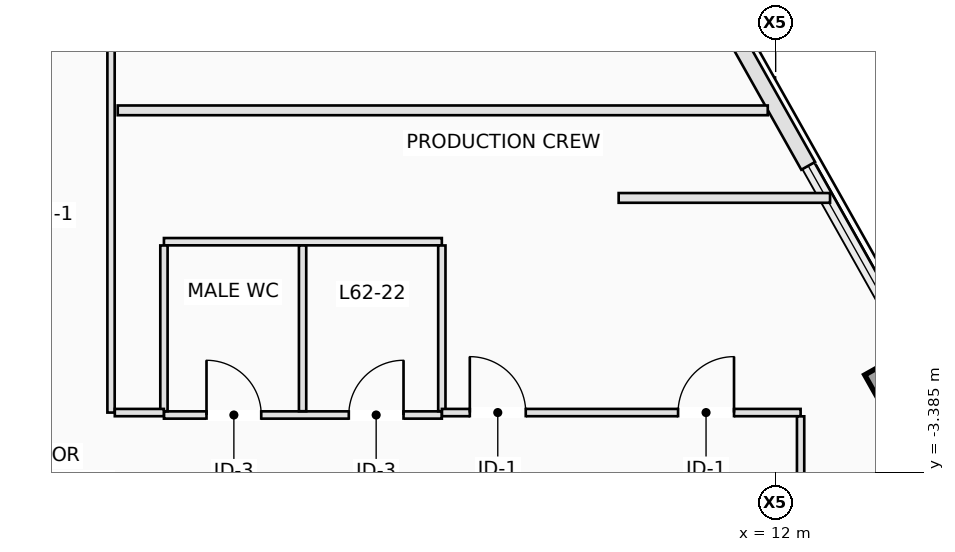
"""IFC4 building model, lengths in metres.
Left out: names, types, materials, properties, quantities, classifications, styles, units other than length and angle.
Written with IfcOpenShell. Run it as: python <this file> out.ifc"""

import sys

from ifc_helpers import new_model, si_unit, direction, frame, frame_2d, origin, origin_2d, place, context, subcontext, project, spatial, rectangle, extrude, element, fill, save


model = new_model("IFC4")
c1 = context("Model", 3, precision=1e-05, world=origin(), true_north=direction((0.0, 1.0)))
c2 = subcontext(c1, "Body", "Model", "MODEL_VIEW")
j1 = project(units=[si_unit("LENGTHUNIT", "METRE"), si_unit("PLANEANGLEUNIT", "RADIAN")], contexts=[c1])
p1 = place(None, origin())
s1 = spatial("IfcSite", under=j1, at=p1, CompositionType="ELEMENT")
p2 = place(p1, origin())
s2 = spatial("IfcBuilding", under=s1, at=p2, CompositionType="ELEMENT")
p3 = place(p2, frame((0.0, 0.0, 225.4)))
s3 = spatial("IfcBuildingStorey", under=s2, at=p3, CompositionType="ELEMENT", Elevation=225.4)
p4 = place(p3, frame((14.077, -1.952, 0.0), z_axis=(0.0, 0.0, 1.0), x_axis=(0.871575139605, 0.490261946333, 0.0)))
e1 = element("IfcColumn", 1, at=p4, inside=s3, PredefinedType="COLUMN", context=c2, shape_type="SweptSolid", body=[
    extrude(rectangle(XDim=0.9, YDim=0.9, at=origin_2d()), origin(), (0.0, 0.0, 1.0), 3.5),
])
p5 = place(p3, frame((10.923, 4.522, 0.0), z_axis=(0.0, 0.0, 1.0), x_axis=(0.490264765862, -0.871573553611, 0.0)))
e2 = element("IfcWall", 2, at=p5, inside=s3, PredefinedType="STANDARD", context=c2, shape_type="SweptSolid", body=[
    extrude(rectangle(XDim=3.287, YDim=0.26, at=frame_2d((1.644, 0.0))), origin(), (0.0, 0.0, 1.0), 1.75),
])
p6 = place(p3, frame((1.94, -2.44, 0.0), z_axis=(0.0, 0.0, 1.0), x_axis=(1.0, 0.0, 0.0)))
e3 = element("IfcWall", 3, at=p6, inside=s3, PredefinedType="PARTITIONING", context=c2, shape_type="SweptSolid", body=[
    extrude(rectangle(XDim=4.57, YDim=0.12, at=frame_2d((2.285, 0.0))), origin(), (0.0, 0.0, 1.0), 2.943),
])
p7 = place(p6, frame((0.7, 0.0, 0.0)))
e4 = element("IfcOpeningElement", 4, at=p7, cuts=e3, PredefinedType="OPENING", context=c2, shape_type="SweptSolid", body=[
    extrude(rectangle(XDim=0.9, YDim=2.12, at=frame_2d((0.45, 1.06))), frame((0.0, 0.07, 0.0), z_axis=(0.0, -1.0, 0.0), x_axis=(1.0, 0.0, 0.0)), (0.0, 0.0, 1.0), 0.14),
])
p8 = place(p6, frame((3.04, 0.0, 0.0)))
e5 = element("IfcOpeningElement", 5, at=p8, cuts=e3, PredefinedType="OPENING", context=c2, shape_type="SweptSolid", body=[
    extrude(rectangle(XDim=0.9, YDim=2.12, at=frame_2d((0.45, 1.06))), frame((0.0, 0.07, 0.0), z_axis=(0.0, -1.0, 0.0), x_axis=(1.0, 0.0, 0.0)), (0.0, 0.0, 1.0), 0.14),
])
p9 = place(p3, frame((1.94, 0.41, 0.0), z_axis=(0.0, 0.0, 1.0), x_axis=(1.0, 0.0, 0.0)))
e6 = element("IfcWall", 6, at=p9, inside=s3, PredefinedType="PARTITIONING", context=c2, shape_type="SweptSolid", body=[
    extrude(rectangle(XDim=4.57, YDim=0.12, at=frame_2d((2.285, 0.0))), origin(), (0.0, 0.0, 1.0), 3.25),
])
for number, where, z_axis, x_axis in (
    (7, (1.94, -2.378, 0.0), (0.0, 0.0, 1.0), (0.0, 1.0, 0.0)),
    (8, (4.22, -2.378, 0.0), (0.0, 0.0, 1.0), (0.0, 1.0, 0.0)),
    (9, (6.51, -2.378, 0.0), (0.0, 0.0, 1.0), (0.0, 1.0, 0.0)),
):
    element("IfcWall", number, at=place(p3, frame(where, z_axis=z_axis, x_axis=x_axis)), inside=s3, PredefinedType="PARTITIONING", context=c2, shape_type="SweptSolid", body=[
        extrude(rectangle(XDim=2.726, YDim=0.12, at=frame_2d((1.363, 0.0))), origin(), (0.0, 0.0, 1.0), 3.25),
    ])
p10 = place(p3, frame((1.07, 9.738, 0.0), z_axis=(0.0, 0.0, 1.0), x_axis=(0.0, -1.0, 0.0)))
e10 = element("IfcWall", 10, at=p10, inside=s3, PredefinedType="PARTITIONING", context=c2, shape_type="SweptSolid", body=[
    extrude(rectangle(XDim=12.138, YDim=0.12, at=frame_2d((6.069, 0.0))), origin(), (0.0, 0.0, 1.0), 3.25),
])
p11 = place(p10, frame((2.998, 0.0, 0.0)))
e11 = element("IfcOpeningElement", 11, at=p11, cuts=e10, PredefinedType="OPENING", context=c2, shape_type="SweptSolid", body=[
    extrude(rectangle(XDim=0.92, YDim=2.12, at=frame_2d((0.46, 1.06))), frame((0.0, 0.07, 0.0), z_axis=(0.0, -1.0, 0.0), x_axis=(1.0, 0.0, 0.0)), (0.0, 0.0, 1.0), 0.14),
])
p12 = place(p3, frame((1.132, -2.4, 0.0), z_axis=(0.0, 0.0, 1.0), x_axis=(1.0, 0.0, 0.0)))
e12 = element("IfcWall", 12, at=p12, inside=s3, PredefinedType="PARTITIONING", context=c2, shape_type="SweptSolid", body=[
    extrude(rectangle(XDim=0.806, YDim=0.12, at=frame_2d((0.403, 0.0))), origin(), (0.0, 0.0, 1.0), 2.943),
])
p13 = place(p3, frame((6.512, -2.4, 0.0), z_axis=(0.0, 0.0, 1.0), x_axis=(1.0, 0.0, 0.0)))
e13 = element("IfcWall", 13, at=p13, inside=s3, PredefinedType="PARTITIONING", context=c2, shape_type="SweptSolid", body=[
    extrude(rectangle(XDim=5.898, YDim=0.12, at=frame_2d((2.949, 0.0))), origin(), (0.0, 0.0, 1.0), 3.25),
])
p14 = place(p13, frame((0.458, 0.0, 0.0)))
e14 = element("IfcOpeningElement", 14, at=p14, cuts=e13, PredefinedType="OPENING", context=c2, shape_type="SweptSolid", body=[
    extrude(rectangle(XDim=0.92, YDim=2.12, at=frame_2d((0.46, 1.06))), frame((0.0, 0.07, 0.0), z_axis=(0.0, -1.0, 0.0), x_axis=(1.0, 0.0, 0.0)), (0.0, 0.0, 1.0), 0.14),
])
p15 = place(p13, frame((3.883, 0.0, 0.0)))
e15 = element("IfcOpeningElement", 15, at=p15, cuts=e13, PredefinedType="OPENING", context=c2, shape_type="SweptSolid", body=[
    extrude(rectangle(XDim=0.92, YDim=2.12, at=frame_2d((0.46, 1.06))), frame((0.0, 0.07, 0.0), z_axis=(0.0, -1.0, 0.0), x_axis=(1.0, 0.0, 0.0)), (0.0, 0.0, 1.0), 0.14),
])
p16 = place(p3, frame((12.41, -2.462, 0.0), z_axis=(0.0, 0.0, 1.0), x_axis=(0.0, -1.0, 0.0)))
e16 = element("IfcWall", 16, at=p16, inside=s3, PredefinedType="PARTITIONING", context=c2, shape_type="SweptSolid", body=[
    extrude(rectangle(XDim=2.611, YDim=0.12, at=frame_2d((1.306, 0.0))), origin(), (0.0, 0.0, 1.0), 3.25),
])
p17 = place(p3, frame((11.87, 2.57, 0.0), z_axis=(0.0, 0.0, 1.0), x_axis=(-1.0, 0.0, 0.0)))
e17 = element("IfcWall", 17, at=p17, inside=s3, PredefinedType="PARTITIONING", context=c2, shape_type="SweptSolid", body=[
    extrude(rectangle(XDim=10.69, YDim=0.16, at=frame_2d((5.345, 0.0))), origin(), (0.0, 0.0, 1.0), 3.25),
])
p18 = place(p3, frame((12.894, 1.13, 0.0), z_axis=(0.0, 0.0, 1.0), x_axis=(-1.0, 0.0, 0.0)))
e18 = element("IfcWall", 18, at=p18, inside=s3, PredefinedType="PARTITIONING", context=c2, shape_type="SweptSolid", body=[
    extrude(rectangle(XDim=3.476, YDim=0.16, at=frame_2d((1.738, 0.0))), origin(), (0.0, 0.0, 1.0), 3.25),
])
p19 = place(p7, origin())
e19 = element("IfcDoor", 19, at=p19, inside=s3, OperationType="SINGLE_SWING_LEFT", PredefinedType="DOOR", context=c2, shape_type="SweptSolid", body=[
    extrude(rectangle(XDim=0.9, YDim=2.12, at=frame_2d((0.45, 1.06))), frame((0.0, 0.025, 0.0), z_axis=(0.0, -1.0, 0.0), x_axis=(1.0, 0.0, 0.0)), (0.0, 0.0, 1.0), 0.05),
])
fill(e4, e19)
p20 = place(p8, origin())
e20 = element("IfcDoor", 20, at=p20, inside=s3, OperationType="SINGLE_SWING_RIGHT", PredefinedType="DOOR", context=c2, shape_type="SweptSolid", body=[
    extrude(rectangle(XDim=0.9, YDim=2.12, at=frame_2d((0.45, 1.06))), frame((0.0, 0.025, 0.0), z_axis=(0.0, -1.0, 0.0), x_axis=(1.0, 0.0, 0.0)), (0.0, 0.0, 1.0), 0.05),
])
fill(e5, e20)
p21 = place(p14, origin())
e21 = element("IfcDoor", 21, at=p21, inside=s3, OperationType="SINGLE_SWING_LEFT", PredefinedType="DOOR", context=c2, shape_type="SweptSolid", body=[
    extrude(rectangle(XDim=0.92, YDim=2.12, at=frame_2d((0.46, 1.06))), frame((0.0, 0.025, 0.0), z_axis=(0.0, -1.0, 0.0), x_axis=(1.0, 0.0, 0.0)), (0.0, 0.0, 1.0), 0.05),
])
fill(e14, e21)
p22 = place(p15, origin())
e22 = element("IfcDoor", 22, at=p22, inside=s3, OperationType="SINGLE_SWING_RIGHT", PredefinedType="DOOR", context=c2, shape_type="SweptSolid", body=[
    extrude(rectangle(XDim=0.92, YDim=2.12, at=frame_2d((0.46, 1.06))), frame((0.0, 0.025, 0.0), z_axis=(0.0, -1.0, 0.0), x_axis=(1.0, 0.0, 0.0)), (0.0, 0.0, 1.0), 0.05),
])
fill(e15, e22)
save(model, sys.argv[1])
